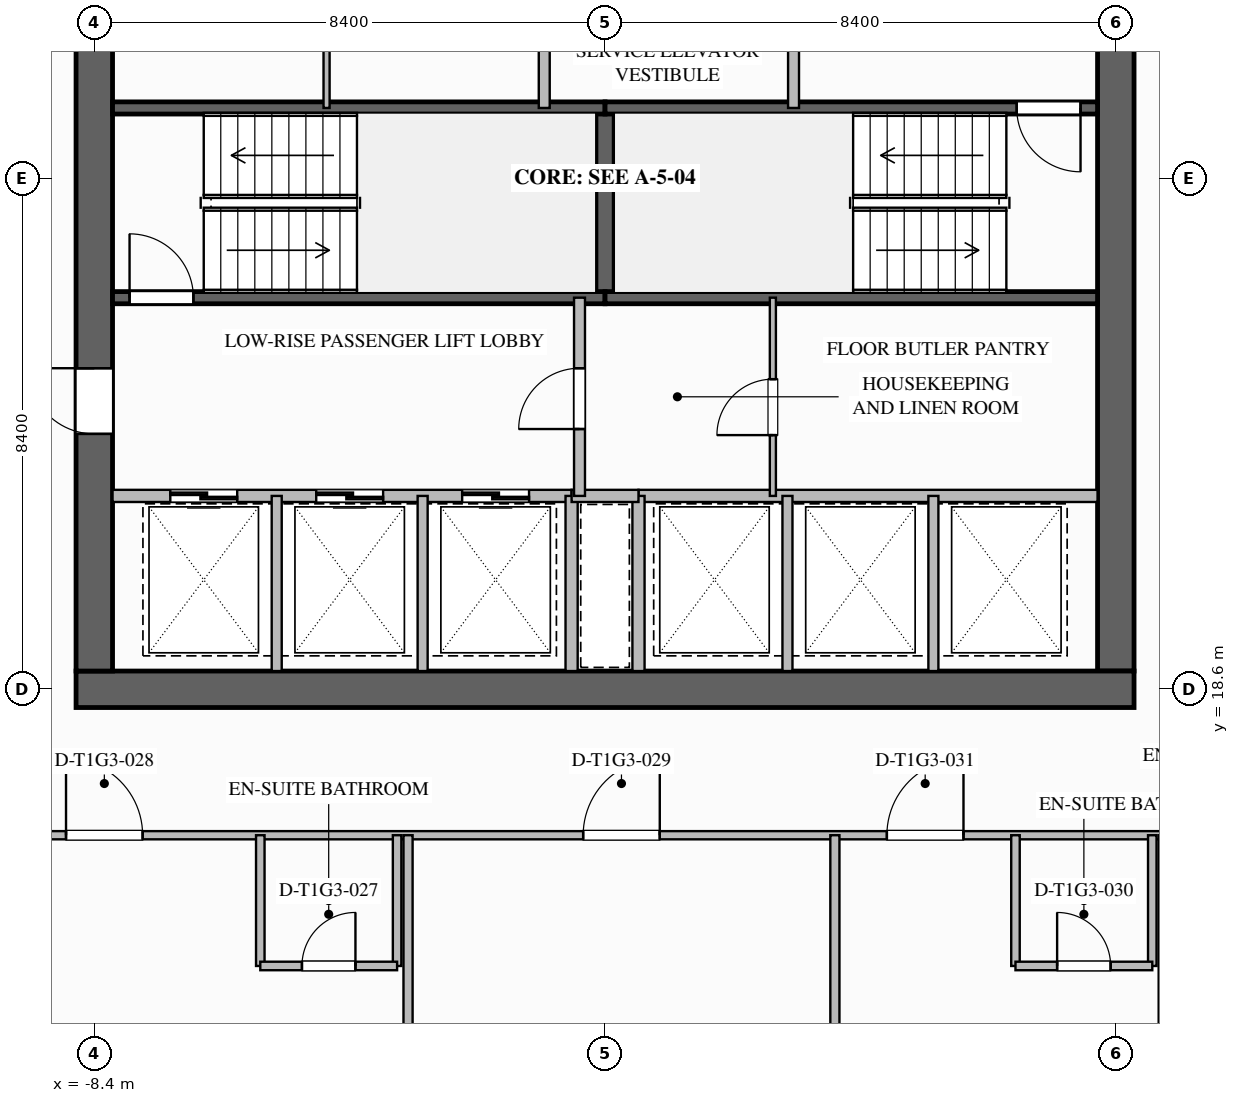
"""IFC4 building model, lengths in metres.
Left out: names, types, materials, properties, quantities, classifications, styles, units other than length and angle.
Written with IfcOpenShell. Run it as: python <this file> out.ifc"""

import sys

from ifc_helpers import new_model, si_unit, direction, frame, frame_2d, origin, place, context, subcontext, project, spatial, rectangle, extrude, element, fill, save


model = new_model("IFC4")
c1 = context("Model", 3, precision=1e-05, world=origin(), true_north=direction((0.0, 1.0)))
c2 = subcontext(c1, "Body", "Model", "MODEL_VIEW")
j1 = project(units=[si_unit("LENGTHUNIT", "METRE"), si_unit("PLANEANGLEUNIT", "RADIAN")], contexts=[c1])
p1 = place(None, origin())
s1 = spatial("IfcSite", under=j1, at=p1, CompositionType="ELEMENT")
p2 = place(p1, origin())
s2 = spatial("IfcBuilding", under=s1, at=p2, CompositionType="ELEMENT")
p3 = place(p2, frame((0.0, 0.0, 61.2)))
s3 = spatial("IfcBuildingStorey", under=s2, at=p3, CompositionType="ELEMENT", Elevation=61.2)
p4 = place(p3, frame((8.4, 35.1, 0.0), z_axis=(0.0, 0.0, 1.0), x_axis=(0.0, -1.0, 0.0)))
e1 = element("IfcWall", 1, at=p4, inside=s3, PredefinedType="SHEAR", context=c2, shape_type="SweptSolid", body=[
    extrude(rectangle(XDim=16.2, YDim=0.6, at=frame_2d((8.1, 0.0))), origin(), (0.0, 0.0, 1.0), 3.5),
])
p5 = place(p4, frame((3.08, 0.0, 0.0)))
e2 = element("IfcOpeningElement", 2, at=p5, cuts=e1, PredefinedType="OPENING", context=c2, shape_type="SweptSolid", body=[
    extrude(rectangle(XDim=1.12, YDim=2.1, at=frame_2d((0.56, 1.05))), frame((0.0, 0.31, 0.0), z_axis=(0.0, -1.0, 0.0), x_axis=(1.0, 0.0, 0.0)), (0.0, 0.0, 1.0), 0.62),
])
p6 = place(p3, frame((8.7, 18.6, 0.0), z_axis=(0.0, 0.0, 1.0), x_axis=(-1.0, 0.0, 0.0)))
e3 = element("IfcWall", 3, at=p6, inside=s3, PredefinedType="SHEAR", context=c2, shape_type="SweptSolid", body=[
    extrude(rectangle(XDim=17.4, YDim=0.6, at=frame_2d((8.7, 0.0))), origin(), (0.0, 0.0, 1.0), 3.5),
])
p7 = place(p3, frame((-8.4, 18.9, 0.0), z_axis=(0.0, 0.0, 1.0), x_axis=(0.0, 1.0, 0.0)))
e4 = element("IfcWall", 4, at=p7, inside=s3, PredefinedType="SHEAR", context=c2, shape_type="SweptSolid", body=[
    extrude(rectangle(XDim=16.2, YDim=0.6, at=frame_2d((8.1, 0.0))), origin(), (0.0, 0.0, 1.0), 3.5),
])
p8 = place(p7, frame((3.9, 0.0, 0.0)))
e5 = element("IfcOpeningElement", 5, at=p8, cuts=e4, PredefinedType="OPENING", context=c2, shape_type="SweptSolid", body=[
    extrude(rectangle(XDim=1.08, YDim=2.04, at=frame_2d((0.54, 1.02))), frame((0.0, 0.31, 0.0), z_axis=(0.0, -1.0, 0.0), x_axis=(1.0, 0.0, 0.0)), (0.0, 0.0, 1.0), 0.62),
])
p9 = place(p3, frame((0.0, 25.04, 0.0), z_axis=(0.0, 0.0, 1.0), x_axis=(0.0, 1.0, 0.0)))
e6 = element("IfcWall", 6, at=p9, inside=s3, PredefinedType="SOLIDWALL", context=c2, shape_type="SweptSolid", body=[
    extrude(rectangle(XDim=3.12, YDim=0.3, at=frame_2d((1.56, 0.0))), origin(), (0.0, 0.0, 1.0), 3.24),
])
p10 = place(p3, frame((-8.1, 25.04, 0.0), z_axis=(0.0, 0.0, 1.0), x_axis=(1.0, 0.0, 0.0)))
e7 = element("IfcWall", 7, at=p10, inside=s3, PredefinedType="SOLIDWALL", context=c2, shape_type="SweptSolid", body=[
    extrude(rectangle(XDim=8.1, YDim=0.2, at=frame_2d((4.05, 0.0))), origin(), (0.0, 0.0, 1.0), 3.24),
])
p11 = place(p10, frame((0.28, 0.0, 0.0)))
e8 = element("IfcOpeningElement", 8, at=p11, cuts=e7, PredefinedType="OPENING", context=c2, shape_type="SweptSolid", body=[
    extrude(rectangle(XDim=1.05, YDim=2.1, at=frame_2d((0.525, 1.05))), frame((0.0, 0.11, 0.0), z_axis=(0.0, -1.0, 0.0), x_axis=(1.0, 0.0, 0.0)), (0.0, 0.0, 1.0), 0.22),
])
for number, where, z_axis, x_axis in (
    (9, (-8.1, 28.16, 0.0), (0.0, 0.0, 1.0), (1.0, 0.0, 0.0)),
    (10, (0.0, 25.04, 0.0), (0.0, 0.0, 1.0), (1.0, 0.0, 0.0)),
):
    element("IfcWall", number, at=place(p3, frame(where, z_axis=z_axis, x_axis=x_axis)), inside=s3, PredefinedType="SOLIDWALL", context=c2, shape_type="SweptSolid", body=[
        extrude(rectangle(XDim=8.1, YDim=0.2, at=frame_2d((4.05, 0.0))), origin(), (0.0, 0.0, 1.0), 3.24),
    ])
p12 = place(p3, frame((8.1, 28.16, 0.0), z_axis=(0.0, 0.0, 1.0), x_axis=(-1.0, 0.0, 0.0)))
e11 = element("IfcWall", 11, at=p12, inside=s3, PredefinedType="SOLIDWALL", context=c2, shape_type="SweptSolid", body=[
    extrude(rectangle(XDim=8.1, YDim=0.2, at=frame_2d((4.05, 0.0))), origin(), (0.0, 0.0, 1.0), 3.24),
])
p13 = place(p12, frame((0.28, 0.0, 0.0)))
e12 = element("IfcOpeningElement", 12, at=p13, cuts=e11, PredefinedType="OPENING", context=c2, shape_type="SweptSolid", body=[
    extrude(rectangle(XDim=1.05, YDim=2.1, at=frame_2d((0.525, 1.05))), frame((0.0, 0.11, 0.0), z_axis=(0.0, -1.0, 0.0), x_axis=(1.0, 0.0, 0.0)), (0.0, 0.0, 1.0), 0.22),
])
p14 = place(p3, frame((3.1, 28.16, 0.0), z_axis=(0.0, 0.0, 1.0), x_axis=(0.0, 1.0, 0.0)))
e13 = element("IfcWall", 13, at=p14, inside=s3, PredefinedType="SOLIDWALL", context=c2, shape_type="SweptSolid", body=[
    extrude(rectangle(XDim=4.06, YDim=0.18, at=frame_2d((2.03, 0.0))), origin(), (0.0, 0.0, 1.0), 3.24),
])
p15 = place(p14, frame((1.4, 0.0, 0.0)))
e14 = element("IfcOpeningElement", 14, at=p15, cuts=e13, PredefinedType="OPENING", context=c2, shape_type="SweptSolid", body=[
    extrude(rectangle(XDim=1.12, YDim=2.1, at=frame_2d((0.56, 1.05))), frame((0.0, 0.1, 0.0), z_axis=(0.0, -1.0, 0.0), x_axis=(1.0, 0.0, 0.0)), (0.0, 0.0, 1.0), 0.2),
])
p16 = place(p3, frame((-1.0, 28.16, 0.0), z_axis=(0.0, 0.0, 1.0), x_axis=(0.0, 1.0, 0.0)))
e15 = element("IfcWall", 15, at=p16, inside=s3, PredefinedType="SOLIDWALL", context=c2, shape_type="SweptSolid", body=[
    extrude(rectangle(XDim=4.02, YDim=0.18, at=frame_2d((2.01, 0.0))), origin(), (0.0, 0.0, 1.0), 3.24),
])
p17 = place(p16, frame((1.4, 0.0, 0.0)))
e16 = element("IfcOpeningElement", 16, at=p17, cuts=e15, PredefinedType="OPENING", context=c2, shape_type="SweptSolid", body=[
    extrude(rectangle(XDim=1.0, YDim=2.1, at=frame_2d((0.5, 1.05))), frame((0.0, 0.1, 0.0), z_axis=(0.0, -1.0, 0.0), x_axis=(1.0, 0.0, 0.0)), (0.0, 0.0, 1.0), 0.2),
])
p18 = place(p3, frame((-4.58, 28.16, 0.0), z_axis=(0.0, 0.0, 1.0), x_axis=(0.0, 1.0, 0.0)))
e17 = element("IfcWall", 17, at=p18, inside=s3, PredefinedType="PARTITIONING", context=c2, shape_type="SweptSolid", body=[
    extrude(rectangle(XDim=4.06, YDim=0.1, at=frame_2d((2.03, 0.0))), origin(), (0.0, 0.0, 1.0), 3.24),
])
p19 = place(p18, frame((1.2, 0.0, 0.0)))
e18 = element("IfcOpeningElement", 18, at=p19, cuts=e17, PredefinedType="OPENING", context=c2, shape_type="SweptSolid", body=[
    extrude(rectangle(XDim=0.92, YDim=2.1, at=frame_2d((0.46, 1.05))), frame((0.0, 0.06, 0.0), z_axis=(0.0, -1.0, 0.0), x_axis=(1.0, 0.0, 0.0)), (0.0, 0.0, 1.0), 0.12),
])
p20 = place(p3, frame((-0.55, 21.78, 0.0), z_axis=(0.0, 0.0, 1.0), x_axis=(-1.0, 0.0, 0.0)))
e19 = element("IfcWall", 19, at=p20, inside=s3, PredefinedType="SOLIDWALL", context=c2, shape_type="SweptSolid", body=[
    extrude(rectangle(XDim=7.55, YDim=0.2, at=frame_2d((3.775, 0.0))), origin(), (0.0, 0.0, 1.0), 3.24),
])
p21 = place(p20, frame((5.5, 0.0, 0.0)))
e20 = element("IfcOpeningElement", 20, at=p21, cuts=e19, PredefinedType="OPENING", context=c2, shape_type="SweptSolid", body=[
    extrude(rectangle(XDim=1.1, YDim=2.2, at=frame_2d((0.55, 1.1))), frame((0.0, 0.11, 0.0), z_axis=(0.0, -1.0, 0.0), x_axis=(1.0, 0.0, 0.0)), (0.0, 0.0, 1.0), 0.22),
])
p22 = place(p20, frame((3.1, 0.0, 0.0)))
e21 = element("IfcOpeningElement", 21, at=p22, cuts=e19, PredefinedType="OPENING", context=c2, shape_type="SweptSolid", body=[
    extrude(rectangle(XDim=1.1, YDim=2.2, at=frame_2d((0.55, 1.1))), frame((0.0, 0.11, 0.0), z_axis=(0.0, -1.0, 0.0), x_axis=(1.0, 0.0, 0.0)), (0.0, 0.0, 1.0), 0.22),
])
p23 = place(p20, frame((0.7, 0.0, 0.0)))
e22 = element("IfcOpeningElement", 22, at=p23, cuts=e19, PredefinedType="OPENING", context=c2, shape_type="SweptSolid", body=[
    extrude(rectangle(XDim=1.1, YDim=2.2, at=frame_2d((0.55, 1.1))), frame((0.0, 0.11, 0.0), z_axis=(0.0, -1.0, 0.0), x_axis=(1.0, 0.0, 0.0)), (0.0, 0.0, 1.0), 0.22),
])
for number, where, z_axis, x_axis in (
    (23, (-5.4, 18.9, 0.0), (0.0, 0.0, 1.0), (0.0, 1.0, 0.0)),
    (24, (-3.0, 18.9, 0.0), (0.0, 0.0, 1.0), (0.0, 1.0, 0.0)),
):
    element("IfcWall", number, at=place(p3, frame(where, z_axis=z_axis, x_axis=x_axis)), inside=s3, PredefinedType="PARTITIONING", context=c2, shape_type="SweptSolid", body=[
        extrude(rectangle(XDim=2.88, YDim=0.165, at=frame_2d((1.44, 0.0))), origin(), (0.0, 0.0, 1.0), 3.24),
    ])
p24 = place(p3, frame((-0.55, 18.9, 0.0), z_axis=(0.0, 0.0, 1.0), x_axis=(0.0, 1.0, 0.0)))
e25 = element("IfcWall", 25, at=p24, inside=s3, PredefinedType="SOLIDWALL", context=c2, shape_type="SweptSolid", body=[
    extrude(rectangle(XDim=2.88, YDim=0.2, at=frame_2d((1.44, 0.0))), origin(), (0.0, 0.0, 1.0), 3.24),
])
p25 = place(p3, frame((8.1, 21.78, 0.0), z_axis=(0.0, 0.0, 1.0), x_axis=(-1.0, 0.0, 0.0)))
e26 = element("IfcWall", 26, at=p25, inside=s3, PredefinedType="SOLIDWALL", context=c2, shape_type="SweptSolid", body=[
    extrude(rectangle(XDim=7.55, YDim=0.2, at=frame_2d((3.775, 0.0))), origin(), (0.0, 0.0, 1.0), 3.24),
])
p26 = place(p3, frame((0.55, 18.9, 0.0), z_axis=(0.0, 0.0, 1.0), x_axis=(0.0, 1.0, 0.0)))
e27 = element("IfcWall", 27, at=p26, inside=s3, PredefinedType="SOLIDWALL", context=c2, shape_type="SweptSolid", body=[
    extrude(rectangle(XDim=2.88, YDim=0.2, at=frame_2d((1.44, 0.0))), origin(), (0.0, 0.0, 1.0), 3.24),
])
for number, where, z_axis, x_axis in (
    (28, (3.0, 18.9, 0.0), (0.0, 0.0, 1.0), (0.0, 1.0, 0.0)),
    (29, (5.4, 18.9, 0.0), (0.0, 0.0, 1.0), (0.0, 1.0, 0.0)),
):
    element("IfcWall", number, at=place(p3, frame(where, z_axis=z_axis, x_axis=x_axis)), inside=s3, PredefinedType="PARTITIONING", context=c2, shape_type="SweptSolid", body=[
        extrude(rectangle(XDim=2.88, YDim=0.165, at=frame_2d((1.44, 0.0))), origin(), (0.0, 0.0, 1.0), 3.24),
    ])
p27 = place(p3, frame((-0.55, 21.78, 0.0), z_axis=(0.0, 0.0, 1.0), x_axis=(1.0, 0.0, 0.0)))
e30 = element("IfcWall", 30, at=p27, inside=s3, PredefinedType="SOLIDWALL", context=c2, shape_type="SweptSolid", body=[
    extrude(rectangle(XDim=1.1, YDim=0.2, at=frame_2d((0.55, 0.0))), origin(), (0.0, 0.0, 1.0), 3.24),
])
p28 = place(p3, frame((-0.42, 21.78, 0.0), z_axis=(0.0, 0.0, 1.0), x_axis=(0.0, 1.0, 0.0)))
e31 = element("IfcWall", 31, at=p28, inside=s3, PredefinedType="SOLIDWALL", context=c2, shape_type="SweptSolid", body=[
    extrude(rectangle(XDim=3.26, YDim=0.18, at=frame_2d((1.63, 0.0))), origin(), (0.0, 0.0, 1.0), 3.24),
])
p29 = place(p28, frame((1.1, 0.0, 0.0)))
e32 = element("IfcOpeningElement", 32, at=p29, cuts=e31, PredefinedType="OPENING", context=c2, shape_type="SweptSolid", body=[
    extrude(rectangle(XDim=1.0, YDim=2.1, at=frame_2d((0.5, 1.05))), frame((0.0, 0.1, 0.0), z_axis=(0.0, -1.0, 0.0), x_axis=(1.0, 0.0, 0.0)), (0.0, 0.0, 1.0), 0.2),
])
p30 = place(p3, frame((2.76, 21.78, 0.0), z_axis=(0.0, 0.0, 1.0), x_axis=(0.0, 1.0, 0.0)))
e33 = element("IfcWall", 33, at=p30, inside=s3, PredefinedType="PARTITIONING", context=c2, shape_type="SweptSolid", body=[
    extrude(rectangle(XDim=3.26, YDim=0.1, at=frame_2d((1.63, 0.0))), origin(), (0.0, 0.0, 1.0), 3.24),
])
p31 = place(p30, frame((1.0, 0.0, 0.0)))
e34 = element("IfcOpeningElement", 34, at=p31, cuts=e33, PredefinedType="OPENING", context=c2, shape_type="SweptSolid", body=[
    extrude(rectangle(XDim=0.92, YDim=2.1, at=frame_2d((0.46, 1.05))), frame((0.0, 0.06, 0.0), z_axis=(0.0, -1.0, 0.0), x_axis=(1.0, 0.0, 0.0)), (0.0, 0.0, 1.0), 0.12),
])
p32 = place(p3, frame((-16.2, 16.2, 0.0), z_axis=(0.0, 0.0, 1.0), x_axis=(1.0, 0.0, 0.0)))
e35 = element("IfcWall", 35, at=p32, inside=s3, PredefinedType="PARTITIONING", context=c2, shape_type="SweptSolid", body=[
    extrude(rectangle(XDim=32.4, YDim=0.135, at=frame_2d((16.2, 0.0))), origin(), (0.0, 0.0, 1.0), 3.24),
])
p33 = place(p32, frame((3.285, 0.0, 0.0)))
e36 = element("IfcOpeningElement", 36, at=p33, cuts=e35, PredefinedType="OPENING", context=c2, shape_type="SweptSolid", body=[
    extrude(rectangle(XDim=1.26, YDim=2.2, at=frame_2d((0.63, 1.1))), frame((0.0, 0.077, 0.0), z_axis=(0.0, -1.0, 0.0), x_axis=(1.0, 0.0, 0.0)), (0.0, 0.0, 1.0), 0.155),
])
p34 = place(p32, frame((7.335, 0.0, 0.0)))
e37 = element("IfcOpeningElement", 37, at=p34, cuts=e35, PredefinedType="OPENING", context=c2, shape_type="SweptSolid", body=[
    extrude(rectangle(XDim=1.26, YDim=2.2, at=frame_2d((0.63, 1.1))), frame((0.0, 0.077, 0.0), z_axis=(0.0, -1.0, 0.0), x_axis=(1.0, 0.0, 0.0)), (0.0, 0.0, 1.0), 0.155),
])
p35 = place(p32, frame((15.84, 0.0, 0.0)))
e38 = element("IfcOpeningElement", 38, at=p35, cuts=e35, PredefinedType="OPENING", context=c2, shape_type="SweptSolid", body=[
    extrude(rectangle(XDim=1.26, YDim=2.2, at=frame_2d((0.63, 1.1))), frame((0.0, 0.077, 0.0), z_axis=(0.0, -1.0, 0.0), x_axis=(1.0, 0.0, 0.0)), (0.0, 0.0, 1.0), 0.155),
])
p36 = place(p32, frame((20.835, 0.0, 0.0)))
e39 = element("IfcOpeningElement", 39, at=p36, cuts=e35, PredefinedType="OPENING", context=c2, shape_type="SweptSolid", body=[
    extrude(rectangle(XDim=1.26, YDim=2.2, at=frame_2d((0.63, 1.1))), frame((0.0, 0.077, 0.0), z_axis=(0.0, -1.0, 0.0), x_axis=(1.0, 0.0, 0.0)), (0.0, 0.0, 1.0), 0.155),
])
p37 = place(p32, frame((29.475, 0.0, 0.0)))
e40 = element("IfcOpeningElement", 40, at=p37, cuts=e35, PredefinedType="OPENING", context=c2, shape_type="SweptSolid", body=[
    extrude(rectangle(XDim=1.26, YDim=2.2, at=frame_2d((0.63, 1.1))), frame((0.0, 0.077, 0.0), z_axis=(0.0, -1.0, 0.0), x_axis=(1.0, 0.0, 0.0)), (0.0, 0.0, 1.0), 0.155),
])
for number, where, z_axis, x_axis in (
    (41, (-5.67, 16.2, 0.0), (0.0, 0.0, 1.0), (0.0, -1.0, 0.0)),
    (42, (-3.42, 16.2, 0.0), (0.0, 0.0, 1.0), (0.0, -1.0, 0.0)),
):
    element("IfcWall", number, at=place(p3, frame(where, z_axis=z_axis, x_axis=x_axis)), inside=s3, PredefinedType="PLUMBINGWALL", context=c2, shape_type="SweptSolid", body=[
        extrude(rectangle(XDim=2.15, YDim=0.14, at=frame_2d((1.075, 0.0))), origin(), (0.0, 0.0, 1.0), 3.24),
    ])
p38 = place(p3, frame((-5.67, 14.05, 0.0), z_axis=(0.0, 0.0, 1.0), x_axis=(1.0, 0.0, 0.0)))
e43 = element("IfcWall", 43, at=p38, inside=s3, PredefinedType="PLUMBINGWALL", context=c2, shape_type="SweptSolid", body=[
    extrude(rectangle(XDim=2.25, YDim=0.14, at=frame_2d((1.125, 0.0))), origin(), (0.0, 0.0, 1.0), 3.24),
])
p39 = place(p38, frame((0.685, 0.0, 0.0)))
e44 = element("IfcOpeningElement", 44, at=p39, cuts=e43, PredefinedType="OPENING", context=c2, shape_type="SweptSolid", body=[
    extrude(rectangle(XDim=0.88, YDim=2.1, at=frame_2d((0.44, 1.05))), frame((0.0, 0.08, 0.0), z_axis=(0.0, -1.0, 0.0), x_axis=(1.0, 0.0, 0.0)), (0.0, 0.0, 1.0), 0.16),
])
for number, where, z_axis, x_axis in (
    (45, (-3.24, 0.8, 0.0), (0.0, 0.0, 1.0), (0.0, 1.0, 0.0)),
    (46, (3.78, 0.8, 0.0), (0.0, 0.0, 1.0), (0.0, 1.0, 0.0)),
):
    element("IfcWall", number, at=place(p3, frame(where, z_axis=z_axis, x_axis=x_axis)), inside=s3, PredefinedType="PARTITIONING", context=c2, shape_type="SweptSolid", body=[
        extrude(rectangle(XDim=15.4, YDim=0.15, at=frame_2d((7.7, 0.0))), origin(), (0.0, 0.0, 1.0), 3.24),
    ])
for number, where, z_axis, x_axis in (
    (47, (6.75, 16.2, 0.0), (0.0, 0.0, 1.0), (0.0, -1.0, 0.0)),
    (48, (9.0, 16.2, 0.0), (0.0, 0.0, 1.0), (0.0, -1.0, 0.0)),
):
    element("IfcWall", number, at=place(p3, frame(where, z_axis=z_axis, x_axis=x_axis)), inside=s3, PredefinedType="PLUMBINGWALL", context=c2, shape_type="SweptSolid", body=[
        extrude(rectangle(XDim=2.15, YDim=0.14, at=frame_2d((1.075, 0.0))), origin(), (0.0, 0.0, 1.0), 3.24),
    ])
p40 = place(p3, frame((6.75, 14.05, 0.0), z_axis=(0.0, 0.0, 1.0), x_axis=(1.0, 0.0, 0.0)))
e49 = element("IfcWall", 49, at=p40, inside=s3, PredefinedType="PLUMBINGWALL", context=c2, shape_type="SweptSolid", body=[
    extrude(rectangle(XDim=2.25, YDim=0.14, at=frame_2d((1.125, 0.0))), origin(), (0.0, 0.0, 1.0), 3.24),
])
p41 = place(p40, frame((0.685, 0.0, 0.0)))
e50 = element("IfcOpeningElement", 50, at=p41, cuts=e49, PredefinedType="OPENING", context=c2, shape_type="SweptSolid", body=[
    extrude(rectangle(XDim=0.88, YDim=2.1, at=frame_2d((0.44, 1.05))), frame((0.0, 0.08, 0.0), z_axis=(0.0, -1.0, 0.0), x_axis=(1.0, 0.0, 0.0)), (0.0, 0.0, 1.0), 0.16),
])
p42 = place(p11, origin())
e51 = element("IfcDoor", 51, at=p42, inside=s3, OperationType="SINGLE_SWING_LEFT", PredefinedType="DOOR", context=c2, shape_type="SweptSolid", body=[
    extrude(rectangle(XDim=1.05, YDim=2.1, at=frame_2d((0.525, 1.05))), frame((0.0, 0.025, 0.0), z_axis=(0.0, -1.0, 0.0), x_axis=(1.0, 0.0, 0.0)), (0.0, 0.0, 1.0), 0.05),
])
fill(e8, e51)
p43 = place(p13, origin())
e52 = element("IfcDoor", 52, at=p43, inside=s3, OperationType="SINGLE_SWING_LEFT", PredefinedType="DOOR", context=c2, shape_type="SweptSolid", body=[
    extrude(rectangle(XDim=1.05, YDim=2.1, at=frame_2d((0.525, 1.05))), frame((0.0, 0.025, 0.0), z_axis=(0.0, -1.0, 0.0), x_axis=(1.0, 0.0, 0.0)), (0.0, 0.0, 1.0), 0.05),
])
fill(e12, e52)
p44 = place(p21, origin())
e53 = element("IfcDoor", 53, at=p44, inside=s3, OperationType="SLIDING_TO_LEFT", PredefinedType="DOOR", context=c2, shape_type="SweptSolid", body=[
    extrude(rectangle(XDim=1.1, YDim=2.2, at=frame_2d((0.55, 1.1))), frame((0.0, 0.025, 0.0), z_axis=(0.0, -1.0, 0.0), x_axis=(1.0, 0.0, 0.0)), (0.0, 0.0, 1.0), 0.05),
])
fill(e20, e53)
p45 = place(p22, origin())
e54 = element("IfcDoor", 54, at=p45, inside=s3, OperationType="SLIDING_TO_LEFT", PredefinedType="DOOR", context=c2, shape_type="SweptSolid", body=[
    extrude(rectangle(XDim=1.1, YDim=2.2, at=frame_2d((0.55, 1.1))), frame((0.0, 0.025, 0.0), z_axis=(0.0, -1.0, 0.0), x_axis=(1.0, 0.0, 0.0)), (0.0, 0.0, 1.0), 0.05),
])
fill(e21, e54)
p46 = place(p23, origin())
e55 = element("IfcDoor", 55, at=p46, inside=s3, OperationType="SLIDING_TO_LEFT", PredefinedType="DOOR", context=c2, shape_type="SweptSolid", body=[
    extrude(rectangle(XDim=1.1, YDim=2.2, at=frame_2d((0.55, 1.1))), frame((0.0, 0.025, 0.0), z_axis=(0.0, -1.0, 0.0), x_axis=(1.0, 0.0, 0.0)), (0.0, 0.0, 1.0), 0.05),
])
fill(e22, e55)
p47 = place(p29, origin())
e56 = element("IfcDoor", 56, at=p47, inside=s3, OperationType="SINGLE_SWING_LEFT", PredefinedType="DOOR", context=c2, shape_type="SweptSolid", body=[
    extrude(rectangle(XDim=1.0, YDim=2.1, at=frame_2d((0.5, 1.05))), frame((0.0, 0.025, 0.0), z_axis=(0.0, -1.0, 0.0), x_axis=(1.0, 0.0, 0.0)), (0.0, 0.0, 1.0), 0.05),
])
fill(e32, e56)
p48 = place(p8, origin())
e57 = element("IfcDoor", 57, at=p48, inside=s3, OperationType="SINGLE_SWING_RIGHT", PredefinedType="DOOR", context=c2, shape_type="SweptSolid", body=[
    extrude(rectangle(XDim=1.08, YDim=2.04, at=frame_2d((0.54, 1.02))), frame((0.0, 0.025, 0.0), z_axis=(0.0, -1.0, 0.0), x_axis=(1.0, 0.0, 0.0)), (0.0, 0.0, 1.0), 0.05),
])
fill(e5, e57)
p49 = place(p31, origin())
e58 = element("IfcDoor", 58, at=p49, inside=s3, OperationType="SINGLE_SWING_LEFT", PredefinedType="DOOR", context=c2, shape_type="SweptSolid", body=[
    extrude(rectangle(XDim=0.92, YDim=2.1, at=frame_2d((0.46, 1.05))), frame((0.0, 0.025, 0.0), z_axis=(0.0, -1.0, 0.0), x_axis=(1.0, 0.0, 0.0)), (0.0, 0.0, 1.0), 0.05),
])
fill(e34, e58)
p50 = place(p39, origin())
e59 = element("IfcDoor", 59, at=p50, inside=s3, OperationType="SINGLE_SWING_RIGHT", PredefinedType="DOOR", context=c2, shape_type="SweptSolid", body=[
    extrude(rectangle(XDim=0.88, YDim=2.1, at=frame_2d((0.44, 1.05))), frame((0.0, 0.025, 0.0), z_axis=(0.0, -1.0, 0.0), x_axis=(1.0, 0.0, 0.0)), (0.0, 0.0, 1.0), 0.05),
])
fill(e44, e59)
p51 = place(p34, origin())
e60 = element("IfcDoor", 60, at=p51, inside=s3, OperationType="SINGLE_SWING_LEFT", PredefinedType="DOOR", context=c2, shape_type="SweptSolid", body=[
    extrude(rectangle(XDim=1.26, YDim=2.2, at=frame_2d((0.63, 1.1))), frame((0.0, 0.025, 0.0), z_axis=(0.0, -1.0, 0.0), x_axis=(1.0, 0.0, 0.0)), (0.0, 0.0, 1.0), 0.05),
])
fill(e37, e60)
p52 = place(p35, origin())
e61 = element("IfcDoor", 61, at=p52, inside=s3, OperationType="SINGLE_SWING_RIGHT", PredefinedType="DOOR", context=c2, shape_type="SweptSolid", body=[
    extrude(rectangle(XDim=1.26, YDim=2.2, at=frame_2d((0.63, 1.1))), frame((0.0, 0.025, 0.0), z_axis=(0.0, -1.0, 0.0), x_axis=(1.0, 0.0, 0.0)), (0.0, 0.0, 1.0), 0.05),
])
fill(e38, e61)
p53 = place(p41, origin())
e62 = element("IfcDoor", 62, at=p53, inside=s3, OperationType="SINGLE_SWING_LEFT", PredefinedType="DOOR", context=c2, shape_type="SweptSolid", body=[
    extrude(rectangle(XDim=0.88, YDim=2.1, at=frame_2d((0.44, 1.05))), frame((0.0, 0.025, 0.0), z_axis=(0.0, -1.0, 0.0), x_axis=(1.0, 0.0, 0.0)), (0.0, 0.0, 1.0), 0.05),
])
fill(e50, e62)
p54 = place(p36, origin())
e63 = element("IfcDoor", 63, at=p54, inside=s3, OperationType="SINGLE_SWING_RIGHT", PredefinedType="DOOR", context=c2, shape_type="SweptSolid", body=[
    extrude(rectangle(XDim=1.26, YDim=2.2, at=frame_2d((0.63, 1.1))), frame((0.0, 0.025, 0.0), z_axis=(0.0, -1.0, 0.0), x_axis=(1.0, 0.0, 0.0)), (0.0, 0.0, 1.0), 0.05),
])
fill(e39, e63)
save(model, sys.argv[1])
